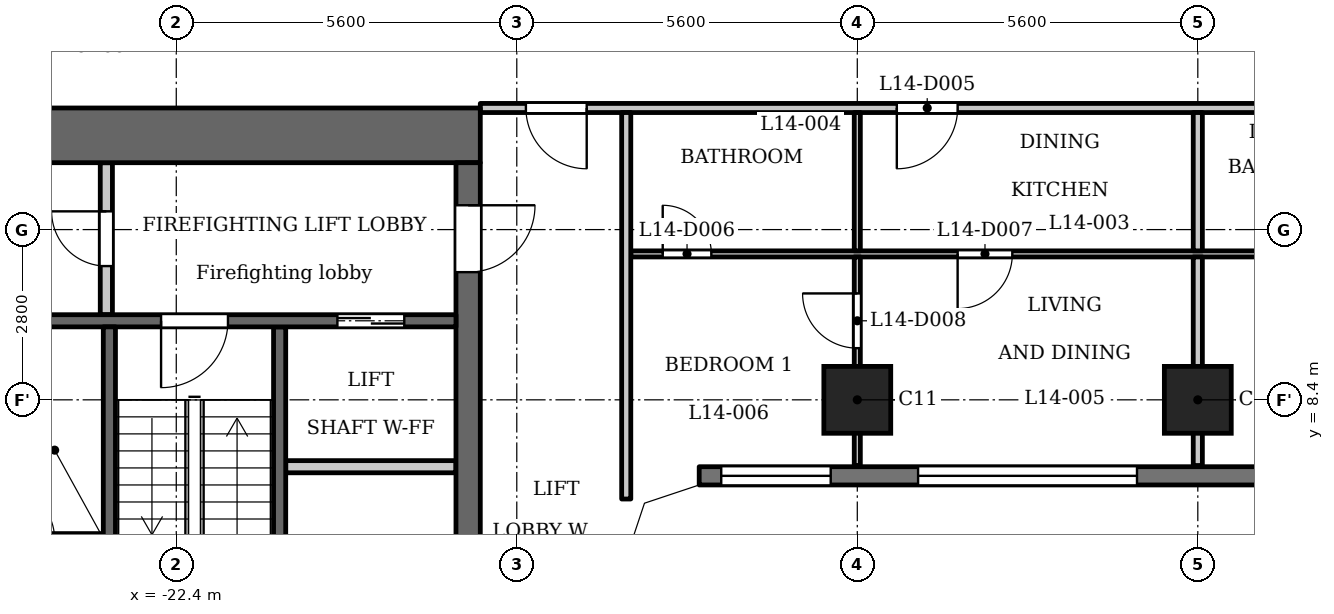
"""IFC4 building model, lengths in metres.
Left out: names, types, materials, properties, quantities, classifications, styles, units other than length and angle.
Written with IfcOpenShell. Run it as: python <this file> out.ifc"""

import sys

from ifc_helpers import new_model, si_unit, direction, frame, frame_2d, origin, origin_2d, place, context, subcontext, project, spatial, polyline, rectangle, outline, extrude, element, fill, save


model = new_model("IFC4")
c1 = context("Model", 3, precision=1e-05, world=origin(), true_north=direction((0.0, 1.0)))
c2 = subcontext(c1, "Body", "Model", "MODEL_VIEW")
j1 = project(units=[si_unit("LENGTHUNIT", "METRE"), si_unit("PLANEANGLEUNIT", "RADIAN")], contexts=[c1])
p1 = place(None, origin())
s1 = spatial("IfcSite", under=j1, at=p1, CompositionType="ELEMENT")
p2 = place(p1, origin())
s2 = spatial("IfcBuilding", under=s1, at=p2, CompositionType="ELEMENT")
p3 = place(p2, frame((0.0, 0.0, 58.5)))
s3 = spatial("IfcBuildingStorey", under=s2, at=p3, CompositionType="ELEMENT", Elevation=58.5)
for number, where, z_axis, x_axis in (
    (1, (-11.2, 8.4, 0.0), (0.0, 0.0, 1.0), (1.0, 0.0, 0.0)),
    (2, (-5.6, 8.4, 0.0), (0.0, 0.0, 1.0), (1.0, 0.0, 0.0)),
):
    element("IfcColumn", number, at=place(p3, frame(where, z_axis=z_axis, x_axis=x_axis)), inside=s3, PredefinedType="COLUMN", context=c2, shape_type="SweptSolid", body=[
        extrude(rectangle(XDim=1.1, YDim=1.1, at=origin_2d()), origin(), (0.0, 0.0, 1.0), 3.5),
    ])
p4 = place(p3, frame((-13.8, 7.15, 0.0), z_axis=(0.0, 0.0, 1.0), x_axis=(1.0, 0.0, 0.0)))
e3 = element("IfcWall", 3, at=p4, inside=s3, PredefinedType="SOLIDWALL", context=c2, shape_type="SweptSolid", body=[
    extrude(rectangle(XDim=27.6, YDim=0.3, at=frame_2d((13.8, 0.0))), origin(), (0.0, 0.0, 1.0), 3.2),
])
p5 = place(p4, frame((0.363, 0.0, 0.9)))
e4 = element("IfcOpeningElement", 4, at=p5, cuts=e3, PredefinedType="OPENING", context=c2, shape_type="SweptSolid", body=[
    extrude(rectangle(XDim=1.8, YDim=1.25, at=frame_2d((0.9, 0.625))), frame((0.0, 0.16, 0.0), z_axis=(0.0, -1.0, 0.0), x_axis=(1.0, 0.0, 0.0)), (0.0, 0.0, 1.0), 0.32),
])
p6 = place(p4, frame((3.6, 0.0, 1.2)))
e5 = element("IfcOpeningElement", 5, at=p6, cuts=e3, PredefinedType="OPENING", context=c2, shape_type="SweptSolid", body=[
    extrude(rectangle(XDim=3.6, YDim=0.95, at=frame_2d((1.8, 0.475))), frame((0.0, 0.16, 0.0), z_axis=(0.0, -1.0, 0.0), x_axis=(1.0, 0.0, 0.0)), (0.0, 0.0, 1.0), 0.32),
])
p7 = place(p4, frame((9.2, 0.0, 1.2)))
e6 = element("IfcOpeningElement", 6, at=p7, cuts=e3, PredefinedType="OPENING", context=c2, shape_type="SweptSolid", body=[
    extrude(rectangle(XDim=3.6, YDim=0.95, at=frame_2d((1.8, 0.475))), frame((0.0, 0.16, 0.0), z_axis=(0.0, -1.0, 0.0), x_axis=(1.0, 0.0, 0.0)), (0.0, 0.0, 1.0), 0.32),
])
p8 = place(p4, frame((14.4, 0.0, 0.9)))
e7 = element("IfcOpeningElement", 7, at=p8, cuts=e3, PredefinedType="OPENING", context=c2, shape_type="SweptSolid", body=[
    extrude(rectangle(XDim=1.8, YDim=1.25, at=frame_2d((0.9, 0.625))), frame((0.0, 0.16, 0.0), z_axis=(0.0, -1.0, 0.0), x_axis=(1.0, 0.0, 0.0)), (0.0, 0.0, 1.0), 0.32),
])
p9 = place(p4, frame((17.2, 0.0, 0.9)))
e8 = element("IfcOpeningElement", 8, at=p9, cuts=e3, PredefinedType="OPENING", context=c2, shape_type="SweptSolid", body=[
    extrude(rectangle(XDim=1.8, YDim=1.25, at=frame_2d((0.9, 0.625))), frame((0.0, 0.16, 0.0), z_axis=(0.0, -1.0, 0.0), x_axis=(1.0, 0.0, 0.0)), (0.0, 0.0, 1.0), 0.32),
])
p10 = place(p4, frame((20.4, 0.0, 1.2)))
e9 = element("IfcOpeningElement", 9, at=p10, cuts=e3, PredefinedType="OPENING", context=c2, shape_type="SweptSolid", body=[
    extrude(rectangle(XDim=3.6, YDim=0.95, at=frame_2d((1.8, 0.475))), frame((0.0, 0.16, 0.0), z_axis=(0.0, -1.0, 0.0), x_axis=(1.0, 0.0, 0.0)), (0.0, 0.0, 1.0), 0.32),
])
p11 = place(p4, frame((25.438, 0.0, 0.9)))
e10 = element("IfcOpeningElement", 10, at=p11, cuts=e3, PredefinedType="OPENING", context=c2, shape_type="SweptSolid", body=[
    extrude(rectangle(XDim=1.8, YDim=1.25, at=frame_2d((0.9, 0.625))), frame((0.0, 0.16, 0.0), z_axis=(0.0, -1.0, 0.0), x_axis=(1.0, 0.0, 0.0)), (0.0, 0.0, 1.0), 0.32),
])
p12 = place(p3, frame((-20.7, 2.6, 0.0), z_axis=(0.0, 0.0, 1.0), x_axis=(0.0, 1.0, 0.0)))
e11 = element("IfcWall", 11, at=p12, inside=s3, PredefinedType="SHEAR", context=c2, shape_type="SweptSolid", body=[
    extrude(rectangle(XDim=7.0, YDim=0.2, at=frame_2d((3.5, 0.0))), origin(), (0.0, 0.0, 1.0), 3.2),
])
p13 = place(p3, frame((-17.4, 12.75, 0.0), z_axis=(0.0, 0.0, 1.0), x_axis=(-1.0, 0.0, 0.0)))
e12 = element("IfcWall", 12, at=p13, inside=s3, PredefinedType="SHEAR", context=c2, shape_type="SweptSolid", body=[
    extrude(rectangle(XDim=10.4, YDim=0.9, at=frame_2d((5.2, 0.0))), origin(), (0.0, 0.0, 1.0), 3.2),
])
p14 = place(p3, frame((-17.6, -12.3, 0.0), z_axis=(0.0, 0.0, 1.0), x_axis=(0.0, 1.0, 0.0)))
e13 = element("IfcWall", 13, at=p14, inside=s3, PredefinedType="SHEAR", context=c2, shape_type="SweptSolid", body=[
    extrude(rectangle(XDim=24.6, YDim=0.4, at=frame_2d((12.3, 0.0))), origin(), (0.0, 0.0, 1.0), 3.2),
])
p15 = place(p14, frame((6.0, 0.0, 0.0)))
e14 = element("IfcOpeningElement", 14, at=p15, cuts=e13, PredefinedType="OPENING", context=c2, shape_type="SweptSolid", body=[
    extrude(rectangle(XDim=1.1, YDim=2.1, at=frame_2d((0.55, 1.05))), frame((0.0, 0.21, 0.0), z_axis=(0.0, -1.0, 0.0), x_axis=(1.0, 0.0, 0.0)), (0.0, 0.0, 1.0), 0.42),
])
p16 = place(p14, frame((8.4, 0.0, 0.0)))
e15 = element("IfcOpeningElement", 15, at=p16, cuts=e13, PredefinedType="OPENING", context=c2, shape_type="SweptSolid", body=[
    extrude(rectangle(XDim=1.1, YDim=2.1, at=frame_2d((0.55, 1.05))), frame((0.0, 0.21, 0.0), z_axis=(0.0, -1.0, 0.0), x_axis=(1.0, 0.0, 0.0)), (0.0, 0.0, 1.0), 0.42),
])
p17 = place(p14, frame((10.8, 0.0, 0.0)))
e16 = element("IfcOpeningElement", 16, at=p17, cuts=e13, PredefinedType="OPENING", context=c2, shape_type="SweptSolid", body=[
    extrude(rectangle(XDim=1.1, YDim=2.1, at=frame_2d((0.55, 1.05))), frame((0.0, 0.21, 0.0), z_axis=(0.0, -1.0, 0.0), x_axis=(1.0, 0.0, 0.0)), (0.0, 0.0, 1.0), 0.42),
])
p18 = place(p14, frame((16.75, 0.0, 0.0)))
e17 = element("IfcOpeningElement", 17, at=p18, cuts=e13, PredefinedType="OPENING", context=c2, shape_type="SweptSolid", body=[
    extrude(rectangle(XDim=0.9, YDim=2.1, at=frame_2d((0.45, 1.05))), frame((0.0, 0.21, 0.0), z_axis=(0.0, -1.0, 0.0), x_axis=(1.0, 0.0, 0.0)), (0.0, 0.0, 1.0), 0.42),
])
p19 = place(p14, frame((22.8, 0.0, 0.0)))
e18 = element("IfcOpeningElement", 18, at=p19, cuts=e13, PredefinedType="OPENING", context=c2, shape_type="SweptSolid", body=[
    extrude(rectangle(XDim=1.1, YDim=2.1, at=frame_2d((0.55, 1.05))), frame((0.0, 0.21, 0.0), z_axis=(0.0, -1.0, 0.0), x_axis=(1.0, 0.0, 0.0)), (0.0, 0.0, 1.0), 0.42),
])
p20 = place(p14, frame((0.7, 0.0, 0.0)))
e19 = element("IfcOpeningElement", 19, at=p20, cuts=e13, PredefinedType="OPENING", context=c2, shape_type="SweptSolid", body=[
    extrude(rectangle(XDim=1.1, YDim=2.1, at=frame_2d((0.55, 1.05))), frame((0.0, 0.21, 0.0), z_axis=(0.0, -1.0, 0.0), x_axis=(1.0, 0.0, 0.0)), (0.0, 0.0, 1.0), 0.42),
])
p21 = place(p14, frame((12.775, 0.0, 0.0)))
e20 = element("IfcOpeningElement", 20, at=p21, cuts=e13, PredefinedType="OPENING", context=c2, shape_type="SweptSolid", body=[
    extrude(rectangle(XDim=1.8, YDim=2.1, at=frame_2d((0.9, 1.05))), frame((0.0, 0.21, 0.0), z_axis=(0.0, -1.0, 0.0), x_axis=(1.0, 0.0, 0.0)), (0.0, 0.0, 1.0), 0.42),
])
p22 = place(p3, frame((-23.55, 9.8, 0.0), z_axis=(0.0, 0.0, 1.0), x_axis=(0.0, 1.0, 0.0)))
e21 = element("IfcWall", 21, at=p22, inside=s3, PredefinedType="PARTITIONING", context=c2, shape_type="SweptSolid", body=[
    extrude(rectangle(XDim=2.5, YDim=0.2, at=frame_2d((1.25, 0.0))), origin(), (0.0, 0.0, 1.0), 3.2),
])
p23 = place(p22, frame((0.8, 0.0, 0.0)))
e22 = element("IfcOpeningElement", 22, at=p23, cuts=e21, PredefinedType="OPENING", context=c2, shape_type="SweptSolid", body=[
    extrude(rectangle(XDim=0.9, YDim=2.1, at=frame_2d((0.45, 1.05))), frame((0.0, 0.11, 0.0), z_axis=(0.0, -1.0, 0.0), x_axis=(1.0, 0.0, 0.0)), (0.0, 0.0, 1.0), 0.22),
])
p24 = place(p3, frame((-23.6, 6.1, 0.0), z_axis=(0.0, 0.0, 1.0), x_axis=(-1.0, 0.0, 0.0)))
e23 = element("IfcWall", 23, at=p24, inside=s3, PredefinedType="PARTITIONING", context=c2, shape_type="SweptSolid", body=[
    extrude(rectangle(XDim=2.5, YDim=0.2, at=frame_2d((1.25, 0.0))), origin(), (0.0, 0.0, 1.0), 3.2),
])
p25 = place(p24, frame((0.8, 0.0, 0.0)))
e24 = element("IfcOpeningElement", 24, at=p25, cuts=e23, PredefinedType="OPENING", context=c2, shape_type="SweptSolid", body=[
    extrude(rectangle(XDim=0.9, YDim=2.1, at=frame_2d((0.45, 1.05))), frame((0.0, 0.11, 0.0), z_axis=(0.0, -1.0, 0.0), x_axis=(1.0, 0.0, 0.0)), (0.0, 0.0, 1.0), 0.22),
])
p26 = place(p3, frame((-17.8, 7.3, 0.0), z_axis=(0.0, 0.0, 1.0), x_axis=(-1.0, 0.0, 0.0)))
e25 = element("IfcWall", 25, at=p26, inside=s3, PredefinedType="PARTITIONING", context=c2, shape_type="SweptSolid", body=[
    extrude(rectangle(XDim=2.8, YDim=0.2, at=frame_2d((1.4, 0.0))), origin(), (0.0, 0.0, 1.0), 3.2),
])
p27 = place(p3, frame((-17.8, 9.7, 0.0), z_axis=(0.0, 0.0, 1.0), x_axis=(-1.0, 0.0, 0.0)))
e26 = element("IfcWall", 26, at=p27, inside=s3, PredefinedType="SHEAR", context=c2, shape_type="SweptSolid", body=[
    extrude(rectangle(XDim=8.3, YDim=0.2, at=frame_2d((4.15, 0.0))), origin(), (0.0, 0.0, 1.0), 3.2),
])
p28 = place(p27, frame((0.85, 0.0, 0.0)))
e27 = element("IfcOpeningElement", 27, at=p28, cuts=e26, PredefinedType="OPENING", context=c2, shape_type="SweptSolid", body=[
    extrude(rectangle(XDim=1.1, YDim=2.1, at=frame_2d((0.55, 1.05))), frame((0.0, 0.11, 0.0), z_axis=(0.0, -1.0, 0.0), x_axis=(1.0, 0.0, 0.0)), (0.0, 0.0, 1.0), 0.22),
])
p29 = place(p27, frame((3.75, 0.0, 0.0)))
e28 = element("IfcOpeningElement", 28, at=p29, cuts=e26, PredefinedType="OPENING", context=c2, shape_type="SweptSolid", body=[
    extrude(rectangle(XDim=1.1, YDim=2.1, at=frame_2d((0.55, 1.05))), frame((0.0, 0.11, 0.0), z_axis=(0.0, -1.0, 0.0), x_axis=(1.0, 0.0, 0.0)), (0.0, 0.0, 1.0), 0.22),
])
p30 = place(p3, frame((-23.5, 2.6, 0.0), z_axis=(0.0, 0.0, 1.0), x_axis=(0.0, 1.0, 0.0)))
e29 = element("IfcWall", 29, at=p30, inside=s3, PredefinedType="SHEAR", context=c2, shape_type="SweptSolid", body=[
    extrude(rectangle(XDim=7.0, YDim=0.2, at=frame_2d((3.5, 0.0))), origin(), (0.0, 0.0, 1.0), 3.2),
])
p31 = place(p3, frame((-14.925, 10.8, 0.0), z_axis=(0.0, 0.0, 1.0), x_axis=(1.0, 0.0, 0.0)))
e30 = element("IfcWall", 30, at=p31, inside=s3, PredefinedType="PARTITIONING", context=c2, shape_type="SweptSolid", body=[
    extrude(rectangle(XDim=29.85, YDim=0.1, at=frame_2d((14.925, 0.0))), origin(), (0.0, 0.0, 1.0), 3.2),
])
p32 = place(p31, frame((0.525, 0.0, 0.0)))
e31 = element("IfcOpeningElement", 31, at=p32, cuts=e30, PredefinedType="OPENING", context=c2, shape_type="SweptSolid", body=[
    extrude(rectangle(XDim=0.8, YDim=2.1, at=frame_2d((0.4, 1.05))), frame((0.0, 0.06, 0.0), z_axis=(0.0, -1.0, 0.0), x_axis=(1.0, 0.0, 0.0)), (0.0, 0.0, 1.0), 0.12),
])
p33 = place(p31, frame((5.375, 0.0, 0.0)))
e32 = element("IfcOpeningElement", 32, at=p33, cuts=e30, PredefinedType="OPENING", context=c2, shape_type="SweptSolid", body=[
    extrude(rectangle(XDim=0.9, YDim=2.1, at=frame_2d((0.45, 1.05))), frame((0.0, 0.06, 0.0), z_axis=(0.0, -1.0, 0.0), x_axis=(1.0, 0.0, 0.0)), (0.0, 0.0, 1.0), 0.12),
])
p34 = place(p31, frame((10.875, 0.0, 0.0)))
e33 = element("IfcOpeningElement", 33, at=p34, cuts=e30, PredefinedType="OPENING", context=c2, shape_type="SweptSolid", body=[
    extrude(rectangle(XDim=0.8, YDim=2.1, at=frame_2d((0.4, 1.05))), frame((0.0, 0.06, 0.0), z_axis=(0.0, -1.0, 0.0), x_axis=(1.0, 0.0, 0.0)), (0.0, 0.0, 1.0), 0.12),
])
p35 = place(p31, frame((12.975, 0.0, 0.0)))
e34 = element("IfcOpeningElement", 34, at=p35, cuts=e30, PredefinedType="OPENING", context=c2, shape_type="SweptSolid", body=[
    extrude(rectangle(XDim=0.9, YDim=2.1, at=frame_2d((0.45, 1.05))), frame((0.0, 0.06, 0.0), z_axis=(0.0, -1.0, 0.0), x_axis=(1.0, 0.0, 0.0)), (0.0, 0.0, 1.0), 0.12),
])
p36 = place(p31, frame((16.575, 0.0, 0.0)))
e35 = element("IfcOpeningElement", 35, at=p36, cuts=e30, PredefinedType="OPENING", context=c2, shape_type="SweptSolid", body=[
    extrude(rectangle(XDim=0.9, YDim=2.1, at=frame_2d((0.45, 1.05))), frame((0.0, 0.06, 0.0), z_axis=(0.0, -1.0, 0.0), x_axis=(1.0, 0.0, 0.0)), (0.0, 0.0, 1.0), 0.12),
])
p37 = place(p31, frame((18.825, 0.0, 0.0)))
e36 = element("IfcOpeningElement", 36, at=p37, cuts=e30, PredefinedType="OPENING", context=c2, shape_type="SweptSolid", body=[
    extrude(rectangle(XDim=0.9, YDim=2.1, at=frame_2d((0.45, 1.05))), frame((0.0, 0.06, 0.0), z_axis=(0.0, -1.0, 0.0), x_axis=(1.0, 0.0, 0.0)), (0.0, 0.0, 1.0), 0.12),
])
p38 = place(p31, frame((21.175, 0.0, 0.0)))
e37 = element("IfcOpeningElement", 37, at=p38, cuts=e30, PredefinedType="OPENING", context=c2, shape_type="SweptSolid", body=[
    extrude(rectangle(XDim=0.8, YDim=2.1, at=frame_2d((0.4, 1.05))), frame((0.0, 0.06, 0.0), z_axis=(0.0, -1.0, 0.0), x_axis=(1.0, 0.0, 0.0)), (0.0, 0.0, 1.0), 0.12),
])
p39 = place(p31, frame((27.775, 0.0, 0.0)))
e38 = element("IfcOpeningElement", 38, at=p39, cuts=e30, PredefinedType="OPENING", context=c2, shape_type="SweptSolid", body=[
    extrude(rectangle(XDim=0.9, YDim=2.1, at=frame_2d((0.45, 1.05))), frame((0.0, 0.06, 0.0), z_axis=(0.0, -1.0, 0.0), x_axis=(1.0, 0.0, 0.0)), (0.0, 0.0, 1.0), 0.12),
])
p40 = place(p3, frame((-17.4, 13.2, 0.0), z_axis=(0.0, 0.0, 1.0), x_axis=(1.0, 0.0, 0.0)))
e39 = element("IfcWall", 39, at=p40, inside=s3, PredefinedType="PARTITIONING", context=c2, shape_type="SweptSolid", body=[
    extrude(rectangle(XDim=34.8, YDim=0.15, at=frame_2d((17.4, 0.0))), origin(), (0.0, 0.0, 1.0), 3.2),
])
p41 = place(p40, frame((0.75, 0.0, 0.0)))
e40 = element("IfcOpeningElement", 40, at=p41, cuts=e39, PredefinedType="OPENING", context=c2, shape_type="SweptSolid", body=[
    extrude(rectangle(XDim=1.0, YDim=2.1, at=frame_2d((0.5, 1.05))), frame((0.0, 0.085, 0.0), z_axis=(0.0, -1.0, 0.0), x_axis=(1.0, 0.0, 0.0)), (0.0, 0.0, 1.0), 0.17),
])
p42 = place(p40, frame((33.15, 0.0, 0.0)))
e41 = element("IfcOpeningElement", 41, at=p42, cuts=e39, PredefinedType="OPENING", context=c2, shape_type="SweptSolid", body=[
    extrude(rectangle(XDim=1.0, YDim=2.1, at=frame_2d((0.5, 1.05))), frame((0.0, 0.085, 0.0), z_axis=(0.0, -1.0, 0.0), x_axis=(1.0, 0.0, 0.0)), (0.0, 0.0, 1.0), 0.17),
])
p43 = place(p40, frame((6.85, 0.0, 0.0)))
e42 = element("IfcOpeningElement", 42, at=p43, cuts=e39, PredefinedType="OPENING", context=c2, shape_type="SweptSolid", body=[
    extrude(rectangle(XDim=1.0, YDim=2.1, at=frame_2d((0.5, 1.05))), frame((0.0, 0.085, 0.0), z_axis=(0.0, -1.0, 0.0), x_axis=(1.0, 0.0, 0.0)), (0.0, 0.0, 1.0), 0.17),
])
p44 = place(p40, frame((18.05, 0.0, 0.0)))
e43 = element("IfcOpeningElement", 43, at=p44, cuts=e39, PredefinedType="OPENING", context=c2, shape_type="SweptSolid", body=[
    extrude(rectangle(XDim=1.0, YDim=2.1, at=frame_2d((0.5, 1.05))), frame((0.0, 0.085, 0.0), z_axis=(0.0, -1.0, 0.0), x_axis=(1.0, 0.0, 0.0)), (0.0, 0.0, 1.0), 0.17),
])
p45 = place(p40, frame((29.25, 0.0, 0.0)))
e44 = element("IfcOpeningElement", 44, at=p45, cuts=e39, PredefinedType="OPENING", context=c2, shape_type="SweptSolid", body=[
    extrude(rectangle(XDim=1.0, YDim=2.1, at=frame_2d((0.5, 1.05))), frame((0.0, 0.085, 0.0), z_axis=(0.0, -1.0, 0.0), x_axis=(1.0, 0.0, 0.0)), (0.0, 0.0, 1.0), 0.17),
])
p46 = place(p3, frame((-15.0, 6.769, 0.0), z_axis=(0.0, 0.0, 1.0), x_axis=(0.0, 1.0, 0.0)))
e45 = element("IfcWall", 45, at=p46, inside=s3, PredefinedType="PARTITIONING", context=c2, shape_type="SweptSolid", body=[
    extrude(rectangle(XDim=6.356, YDim=0.15, at=frame_2d((3.178, 0.0))), origin(), (0.0, 0.0, 1.0), 3.2),
])
p47 = place(p3, frame((-11.2, 7.32, 0.0), z_axis=(0.0, 0.0, 1.0), x_axis=(0.0, 1.0, 0.0)))
e46 = element("IfcWall", 46, at=p47, inside=s3, PredefinedType="PARTITIONING", context=c2, shape_type="SweptSolid", body=[
    extrude(rectangle(XDim=3.43, YDim=0.1, at=frame_2d((1.715, 0.0))), origin(), (0.0, 0.0, 1.0), 3.2),
])
p48 = place(p47, frame((1.93, 0.0, 0.0)))
e47 = element("IfcOpeningElement", 47, at=p48, cuts=e46, PredefinedType="OPENING", context=c2, shape_type="SweptSolid", body=[
    extrude(rectangle(XDim=0.9, YDim=2.1, at=frame_2d((0.45, 1.05))), frame((0.0, 0.06, 0.0), z_axis=(0.0, -1.0, 0.0), x_axis=(1.0, 0.0, 0.0)), (0.0, 0.0, 1.0), 0.12),
])
p49 = place(p3, frame((-11.2, 10.85, 0.0), z_axis=(0.0, 0.0, 1.0), x_axis=(0.0, 1.0, 0.0)))
e48 = element("IfcWall", 48, at=p49, inside=s3, PredefinedType="PARTITIONING", context=c2, shape_type="SweptSolid", body=[
    extrude(rectangle(XDim=2.275, YDim=0.1, at=frame_2d((1.137, 0.0))), origin(), (0.0, 0.0, 1.0), 3.2),
])
p50 = place(p3, frame((-5.6, 7.32, 0.0), z_axis=(0.0, 0.0, 1.0), x_axis=(0.0, 1.0, 0.0)))
e49 = element("IfcWall", 49, at=p50, inside=s3, PredefinedType="PARTITIONING", context=c2, shape_type="SweptSolid", body=[
    extrude(rectangle(XDim=3.43, YDim=0.15, at=frame_2d((1.715, 0.0))), origin(), (0.0, 0.0, 1.0), 3.2),
])
p51 = place(p3, frame((-5.6, 10.85, 0.0), z_axis=(0.0, 0.0, 1.0), x_axis=(0.0, 1.0, 0.0)))
e50 = element("IfcWall", 50, at=p51, inside=s3, PredefinedType="PARTITIONING", context=c2, shape_type="SweptSolid", body=[
    extrude(rectangle(XDim=2.275, YDim=0.15, at=frame_2d((1.137, 0.0))), origin(), (0.0, 0.0, 1.0), 3.2),
])
p52 = place(p3, origin())
e51 = element("IfcWall", 51, at=p52, inside=s3, PredefinedType="SOLIDWALL", context=c2, shape_type="SweptSolid", body=[
    extrude(outline(polyline([(-13.849, 7.3), (-14.937, 6.937), (-15.3, 5.849), (-15.3, 5.8), (-15.0, 5.8), (-14.7, 6.7), (-13.8, 7.0), (-13.8, 7.3), (-13.849, 7.3)])), origin(), (0.0, 0.0, 1.0), 3.2),
])
p53 = place(p28, origin())
e52 = element("IfcDoor", 52, at=p53, inside=s3, OperationType="DOUBLE_DOOR_SLIDING", PredefinedType="DOOR", context=c2, shape_type="SweptSolid", body=[
    extrude(rectangle(XDim=1.1, YDim=2.1, at=frame_2d((0.55, 1.05))), frame((0.0, 0.025, 0.0), z_axis=(0.0, -1.0, 0.0), x_axis=(1.0, 0.0, 0.0)), (0.0, 0.0, 1.0), 0.05),
])
fill(e27, e52)
p54 = place(p19, origin())
e53 = element("IfcDoor", 53, at=p54, inside=s3, OperationType="SINGLE_SWING_RIGHT", PredefinedType="DOOR", context=c2, shape_type="SweptSolid", body=[
    extrude(rectangle(XDim=1.1, YDim=2.1, at=frame_2d((0.55, 1.05))), frame((0.0, 0.025, 0.0), z_axis=(0.0, -1.0, 0.0), x_axis=(1.0, 0.0, 0.0)), (0.0, 0.0, 1.0), 0.05),
])
fill(e18, e53)
p55 = place(p23, origin())
e54 = element("IfcDoor", 54, at=p55, inside=s3, OperationType="SINGLE_SWING_LEFT", PredefinedType="DOOR", context=c2, shape_type="SweptSolid", body=[
    extrude(rectangle(XDim=0.9, YDim=2.1, at=frame_2d((0.45, 1.05))), frame((0.0, 0.025, 0.0), z_axis=(0.0, -1.0, 0.0), x_axis=(1.0, 0.0, 0.0)), (0.0, 0.0, 1.0), 0.05),
])
fill(e22, e54)
p56 = place(p29, origin())
e55 = element("IfcDoor", 55, at=p56, inside=s3, OperationType="SINGLE_SWING_LEFT", PredefinedType="DOOR", context=c2, shape_type="SweptSolid", body=[
    extrude(rectangle(XDim=1.1, YDim=2.1, at=frame_2d((0.55, 1.05))), frame((0.0, 0.025, 0.0), z_axis=(0.0, -1.0, 0.0), x_axis=(1.0, 0.0, 0.0)), (0.0, 0.0, 1.0), 0.05),
])
fill(e28, e55)
p57 = place(p41, origin())
e56 = element("IfcDoor", 56, at=p57, inside=s3, OperationType="SINGLE_SWING_RIGHT", PredefinedType="DOOR", context=c2, shape_type="SweptSolid", body=[
    extrude(rectangle(XDim=1.0, YDim=2.1, at=frame_2d((0.5, 1.05))), frame((0.0, 0.025, 0.0), z_axis=(0.0, -1.0, 0.0), x_axis=(1.0, 0.0, 0.0)), (0.0, 0.0, 1.0), 0.05),
])
fill(e40, e56)
p58 = place(p43, origin())
e57 = element("IfcDoor", 57, at=p58, inside=s3, OperationType="SINGLE_SWING_LEFT", PredefinedType="DOOR", context=c2, shape_type="SweptSolid", body=[
    extrude(rectangle(XDim=1.0, YDim=2.1, at=frame_2d((0.5, 1.05))), frame((0.0, 0.025, 0.0), z_axis=(0.0, -1.0, 0.0), x_axis=(1.0, 0.0, 0.0)), (0.0, 0.0, 1.0), 0.05),
])
fill(e42, e57)
p59 = place(p32, origin())
e58 = element("IfcDoor", 58, at=p59, inside=s3, OperationType="SINGLE_SWING_RIGHT", PredefinedType="DOOR", context=c2, shape_type="SweptSolid", body=[
    extrude(rectangle(XDim=0.8, YDim=2.1, at=frame_2d((0.4, 1.05))), frame((0.0, 0.025, 0.0), z_axis=(0.0, -1.0, 0.0), x_axis=(1.0, 0.0, 0.0)), (0.0, 0.0, 1.0), 0.05),
])
fill(e31, e58)
p60 = place(p33, origin())
e59 = element("IfcDoor", 59, at=p60, inside=s3, OperationType="SINGLE_SWING_LEFT", PredefinedType="DOOR", context=c2, shape_type="SweptSolid", body=[
    extrude(rectangle(XDim=0.9, YDim=2.1, at=frame_2d((0.45, 1.05))), frame((0.0, 0.025, 0.0), z_axis=(0.0, -1.0, 0.0), x_axis=(1.0, 0.0, 0.0)), (0.0, 0.0, 1.0), 0.05),
])
fill(e32, e59)
p61 = place(p48, origin())
e60 = element("IfcDoor", 60, at=p61, inside=s3, OperationType="SINGLE_SWING_LEFT", PredefinedType="DOOR", context=c2, shape_type="SweptSolid", body=[
    extrude(rectangle(XDim=0.9, YDim=2.1, at=frame_2d((0.45, 1.05))), frame((0.0, 0.025, 0.0), z_axis=(0.0, -1.0, 0.0), x_axis=(1.0, 0.0, 0.0)), (0.0, 0.0, 1.0), 0.05),
])
fill(e47, e60)
p62 = place(p5, origin())
e61 = element("IfcWindow", 61, at=p62, inside=s3, PartitioningType="SINGLE_PANEL", PredefinedType="WINDOW", context=c2, shape_type="SweptSolid", body=[
    extrude(rectangle(XDim=1.8, YDim=1.25, at=frame_2d((0.9, 0.625))), frame((0.0, 0.03, 0.0), z_axis=(0.0, -1.0, 0.0), x_axis=(1.0, 0.0, 0.0)), (0.0, 0.0, 1.0), 0.06),
])
fill(e4, e61)
p63 = place(p6, origin())
e62 = element("IfcWindow", 62, at=p63, inside=s3, PartitioningType="SINGLE_PANEL", PredefinedType="WINDOW", context=c2, shape_type="SweptSolid", body=[
    extrude(rectangle(XDim=3.6, YDim=0.95, at=frame_2d((1.8, 0.475))), frame((0.0, 0.03, 0.0), z_axis=(0.0, -1.0, 0.0), x_axis=(1.0, 0.0, 0.0)), (0.0, 0.0, 1.0), 0.06),
])
fill(e5, e62)
save(model, sys.argv[1])
